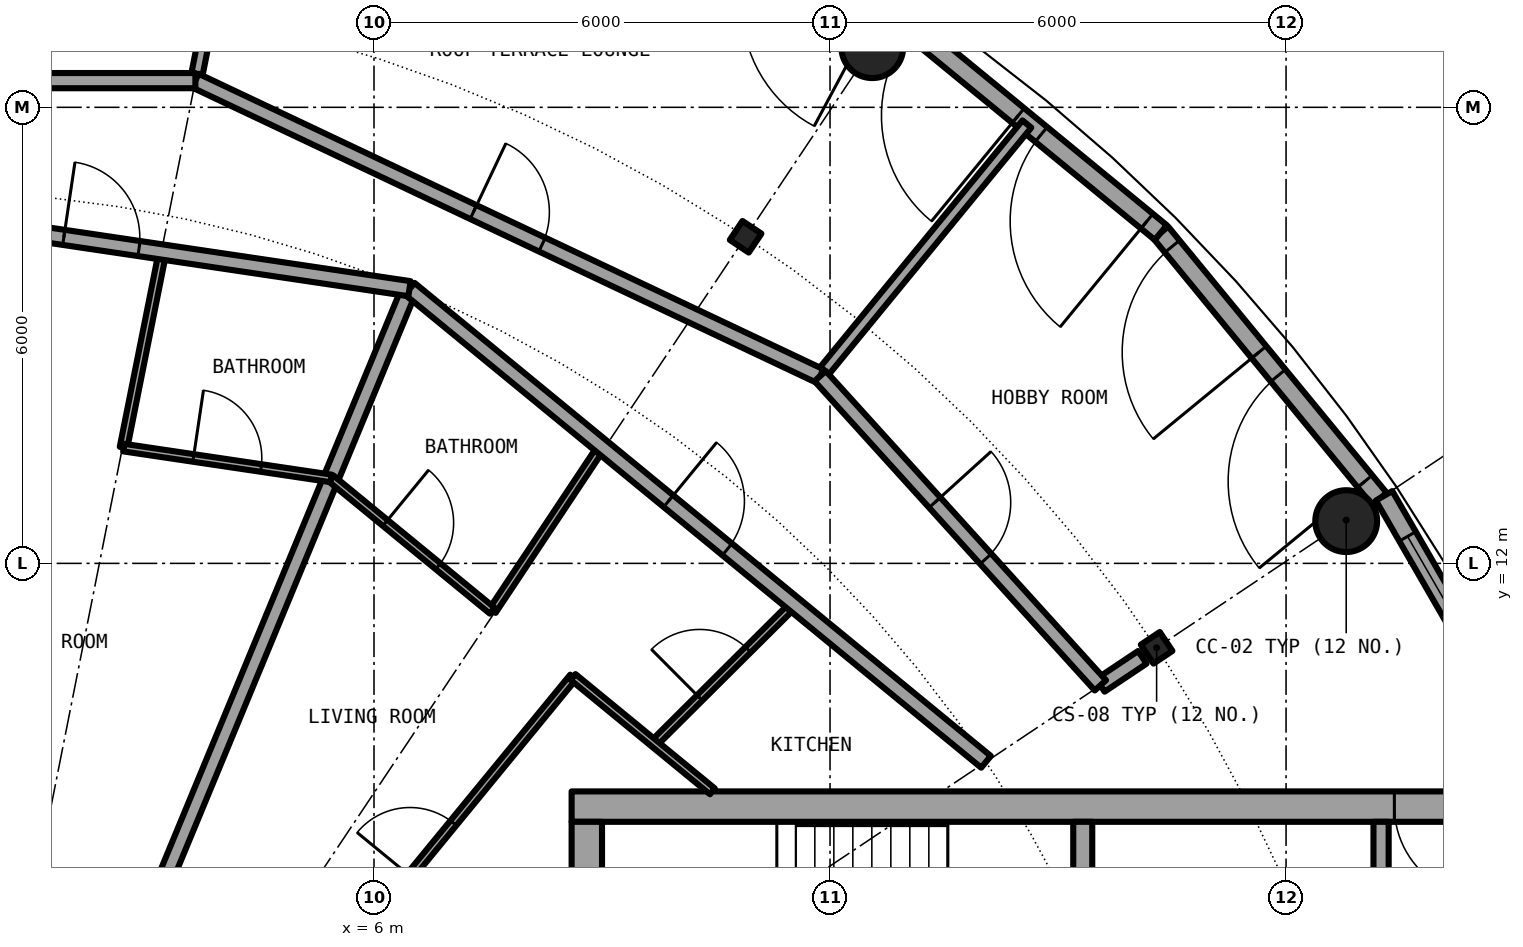
"""IFC4 building model, lengths in metres.
Left out: names, types, materials, properties, quantities, classifications, styles, units other than length and angle.
Written with IfcOpenShell. Run it as: python <this file> out.ifc"""

import sys

from ifc_helpers import new_model, si_unit, direction, frame, frame_2d, origin, origin_2d, place, context, subcontext, project, spatial, rectangle, hollow_circle, i_section, extrude, element, fill, save


model = new_model("IFC4")
c1 = context("Model", 3, precision=1e-05, world=origin(), true_north=direction((0.0, 1.0)))
c2 = subcontext(c1, "Body", "Model", "MODEL_VIEW")
j1 = project(units=[si_unit("LENGTHUNIT", "METRE"), si_unit("PLANEANGLEUNIT", "RADIAN")], contexts=[c1])
p1 = place(None, origin())
s1 = spatial("IfcSite", under=j1, at=p1, CompositionType="ELEMENT")
p2 = place(p1, origin())
s2 = spatial("IfcBuilding", under=s1, at=p2, CompositionType="ELEMENT")
p3 = place(p2, frame((0.0, 0.0, 249.3)))
s3 = spatial("IfcBuildingStorey", under=s2, at=p3, CompositionType="ELEMENT", Elevation=249.3)
for number, where, z_axis, x_axis in (
    (1, (18.791, 12.556, 0.0), (0.0, 0.0, 1.0), (1.0, 0.0, 0.0)),
    (2, (12.556, 18.791, 0.0), (0.0, 0.0, 1.0), (1.0, 0.0, 0.0)),
):
    element("IfcColumn", number, at=place(p3, frame(where, z_axis=z_axis, x_axis=x_axis)), inside=s3, PredefinedType="COLUMN", context=c2, shape_type="SweptSolid", body=[
        extrude(hollow_circle(Radius=0.406, WallThickness=0.03, at=origin_2d()), origin(), (0.0, 0.0, 1.0), 3.05),
    ])
for number, where, z_axis, x_axis in (
    (3, (16.297, 10.889, 0.0), (0.0, 0.0, 1.0), (0.831, 0.556, 0.0)),
    (4, (10.889, 16.297, 0.0), (0.0, 0.0, 1.0), (0.556, 0.831, 0.0)),
):
    element("IfcColumn", number, at=place(p3, frame(where, z_axis=z_axis, x_axis=x_axis)), inside=s3, PredefinedType="COLUMN", context=c2, shape_type="SweptSolid", body=[
        extrude(i_section(OverallWidth=0.3, OverallDepth=0.3, WebThickness=0.011, FlangeThickness=0.019, FilletRadius=0.027, at=origin_2d()), origin(), (0.0, 0.0, 1.0), 3.05),
    ])
p4 = place(p3, frame((19.228, 12.848, 0.0), z_axis=(0.0, 0.0, 1.0), x_axis=(-0.634418942337, 0.772989395532, 0.0)))
e5 = element("IfcWall", 5, at=p4, inside=s3, PredefinedType="SOLIDWALL", context=c2, shape_type="SweptSolid", body=[
    extrude(rectangle(XDim=4.533, YDim=0.25, at=frame_2d((2.267, 0.0))), origin(), (0.0, 0.0, 1.0), 2.7),
])
p5 = place(p4, frame((0.3, 0.0, 0.0)))
e6 = element("IfcOpeningElement", 6, at=p5, cuts=e5, PredefinedType="OPENING", context=c2, shape_type="SweptSolid", body=[
    extrude(rectangle(XDim=1.8, YDim=2.2, at=frame_2d((0.9, 1.1))), frame((0.0, 0.135, 0.0), z_axis=(0.0, -1.0, 0.0), x_axis=(1.0, 0.0, 0.0)), (0.0, 0.0, 1.0), 0.27),
])
p6 = place(p4, frame((2.497, 0.0, 0.0)))
e7 = element("IfcOpeningElement", 7, at=p6, cuts=e5, PredefinedType="OPENING", context=c2, shape_type="SweptSolid", body=[
    extrude(rectangle(XDim=1.8, YDim=2.2, at=frame_2d((0.9, 1.1))), frame((0.0, 0.135, 0.0), z_axis=(0.0, -1.0, 0.0), x_axis=(1.0, 0.0, 0.0)), (0.0, 0.0, 1.0), 0.27),
])
p7 = place(p3, frame((16.352, 16.352, 0.0), z_axis=(0.0, 0.0, 1.0), x_axis=(-0.772989395532, 0.634418942337, 0.0)))
e8 = element("IfcWall", 8, at=p7, inside=s3, PredefinedType="SOLIDWALL", context=c2, shape_type="SweptSolid", body=[
    extrude(rectangle(XDim=4.533, YDim=0.25, at=frame_2d((2.267, 0.0))), origin(), (0.0, 0.0, 1.0), 2.7),
])
p8 = place(p7, frame((0.236, 0.0, 0.0)))
e9 = element("IfcOpeningElement", 9, at=p8, cuts=e8, PredefinedType="OPENING", context=c2, shape_type="SweptSolid", body=[
    extrude(rectangle(XDim=1.8, YDim=2.2, at=frame_2d((0.9, 1.1))), frame((0.0, 0.135, 0.0), z_axis=(0.0, -1.0, 0.0), x_axis=(1.0, 0.0, 0.0)), (0.0, 0.0, 1.0), 0.27),
])
p9 = place(p7, frame((2.427, 0.0, 0.0)))
e10 = element("IfcOpeningElement", 10, at=p9, cuts=e8, PredefinedType="OPENING", context=c2, shape_type="SweptSolid", body=[
    extrude(rectangle(XDim=1.8, YDim=2.2, at=frame_2d((0.9, 1.1))), frame((0.0, 0.135, 0.0), z_axis=(0.0, -1.0, 0.0), x_axis=(1.0, 0.0, 0.0)), (0.0, 0.0, 1.0), 0.27),
])
p10 = place(p3, frame((20.807, 10.261, 0.0), z_axis=(0.0, 0.0, 1.0), x_axis=(-0.499903546559, 0.866081084043, 0.0)))
e11 = element("IfcWall", 11, at=p10, inside=s3, PredefinedType="SOLIDWALL", context=c2, shape_type="SweptSolid", body=[
    extrude(rectangle(XDim=3.034, YDim=0.25, at=frame_2d((1.517, 0.0))), origin(), (0.0, 0.0, 1.0), 2.7),
])
p11 = place(p10, frame((0.617, 0.0, 0.3)))
e12 = element("IfcOpeningElement", 12, at=p11, cuts=e11, PredefinedType="OPENING", context=c2, shape_type="SweptSolid", body=[
    extrude(rectangle(XDim=1.8, YDim=2.1, at=frame_2d((0.9, 1.05))), frame((0.0, 0.135, 0.0), z_axis=(0.0, -1.0, 0.0), x_axis=(1.0, 0.0, 0.0)), (0.0, 0.0, 1.0), 0.27),
])
p12 = place(p3, frame((21.1, 8.8, 0.0), z_axis=(0.0, 0.0, 1.0), x_axis=(-1.0, 0.0, 0.0)))
e13 = element("IfcWall", 13, at=p12, inside=s3, PredefinedType="SHEAR", context=c2, shape_type="SweptSolid", body=[
    extrude(rectangle(XDim=12.5, YDim=0.4, at=frame_2d((6.25, 0.0))), origin(), (0.0, 0.0, 1.0), 3.05),
])
p13 = place(p12, frame((0.475, 0.0, 0.0)))
e14 = element("IfcOpeningElement", 14, at=p13, cuts=e13, PredefinedType="OPENING", context=c2, shape_type="SweptSolid", body=[
    extrude(rectangle(XDim=1.2, YDim=2.3, at=frame_2d((0.6, 1.15))), frame((0.0, 0.21, 0.0), z_axis=(0.0, -1.0, 0.0), x_axis=(1.0, 0.0, 0.0)), (0.0, 0.0, 1.0), 0.42),
])
p14 = place(p3, frame((8.8, -8.6, 0.0), z_axis=(0.0, 0.0, 1.0), x_axis=(0.0, 1.0, 0.0)))
e15 = element("IfcWall", 15, at=p14, inside=s3, PredefinedType="SHEAR", context=c2, shape_type="SweptSolid", body=[
    extrude(rectangle(XDim=17.2, YDim=0.4, at=frame_2d((8.6, 0.0))), origin(), (0.0, 0.0, 1.0), 3.05),
])
p15 = place(p14, frame((7.4, 0.0, 0.1)))
e16 = element("IfcOpeningElement", 16, at=p15, cuts=e15, PredefinedType="OPENING", context=c2, shape_type="SweptSolid", body=[
    extrude(rectangle(XDim=2.4, YDim=2.2, at=frame_2d((1.2, 1.1))), frame((0.0, 0.21, 0.0), z_axis=(0.0, -1.0, 0.0), x_axis=(1.0, 0.0, 0.0)), (0.0, 0.0, 1.0), 0.42),
])
p16 = place(p3, frame((15.325, 4.65, 0.0), z_axis=(0.0, 0.0, 1.0), x_axis=(0.0, 1.0, 0.0)))
e17 = element("IfcWall", 17, at=p16, inside=s3, PredefinedType="SHEAR", context=c2, shape_type="SweptSolid", body=[
    extrude(rectangle(XDim=3.95, YDim=0.25, at=frame_2d((1.975, 0.0))), origin(), (0.0, 0.0, 1.0), 3.05),
])
p17 = place(p16, frame((1.375, 0.0, 0.0)))
e18 = element("IfcOpeningElement", 18, at=p17, cuts=e17, PredefinedType="OPENING", context=c2, shape_type="SweptSolid", body=[
    extrude(rectangle(XDim=1.2, YDim=2.3, at=frame_2d((0.6, 1.15))), frame((0.0, 0.135, 0.0), z_axis=(0.0, -1.0, 0.0), x_axis=(1.0, 0.0, 0.0)), (0.0, 0.0, 1.0), 0.27),
])
p18 = place(p3, frame((19.25, 1.575, 0.0), z_axis=(0.0, 0.0, 1.0), x_axis=(0.0, 1.0, 0.0)))
e19 = element("IfcWall", 19, at=p18, inside=s3, PredefinedType="SOLIDWALL", context=c2, shape_type="SweptSolid", body=[
    extrude(rectangle(XDim=7.025, YDim=0.2, at=frame_2d((3.513, 0.0))), origin(), (0.0, 0.0, 1.0), 2.7),
])
p19 = place(p18, frame((4.475, 0.0, 0.0)))
e20 = element("IfcOpeningElement", 20, at=p19, cuts=e19, PredefinedType="OPENING", context=c2, shape_type="SweptSolid", body=[
    extrude(rectangle(XDim=1.1, YDim=2.3, at=frame_2d((0.55, 1.15))), frame((0.0, 0.11, 0.0), z_axis=(0.0, -1.0, 0.0), x_axis=(1.0, 0.0, 0.0)), (0.0, 0.0, 1.0), 0.22),
])
p20 = place(p3, frame((2.704, 13.524, 0.0), z_axis=(0.0, 0.0, 1.0), x_axis=(0.195937128464, 0.980616460034, 0.0)))
e21 = element("IfcWall", 21, at=p20, inside=s3, PredefinedType="PARTITIONING", context=c2, shape_type="SweptSolid", body=[
    extrude(rectangle(XDim=2.623, YDim=0.1, at=frame_2d((1.312, 0.0))), origin(), (0.0, 0.0, 1.0), 2.7),
])
p21 = place(p3, frame((2.955, 7.132, 0.0), z_axis=(0.0, 0.0, 1.0), x_axis=(0.382556139466, 0.923932248683, 0.0)))
e22 = element("IfcWall", 22, at=p21, inside=s3, PredefinedType="PARTITIONING", context=c2, shape_type="SweptSolid", body=[
    extrude(rectangle(XDim=9.18, YDim=0.2, at=frame_2d((4.59, 0.0))), origin(), (0.0, 0.0, 1.0), 2.7),
])
p22 = place(p3, frame((3.654, 18.35, 0.0), z_axis=(0.0, 0.0, 1.0), x_axis=(0.194656627734, 0.980871447887, 0.0)))
e23 = element("IfcWall", 23, at=p22, inside=s3, PredefinedType="PARTITIONING", context=c2, shape_type="SweptSolid", body=[
    extrude(rectangle(XDim=0.74, YDim=0.15, at=frame_2d((0.37, 0.0))), origin(), (0.0, 0.0, 1.0), 2.7),
])
p23 = place(p3, frame((4.898, 5.968, 0.0), z_axis=(0.0, 0.0, 1.0), x_axis=(0.634358693064, 0.773038840249, 0.0)))
e24 = element("IfcWall", 24, at=p23, inside=s3, PredefinedType="PARTITIONING", context=c2, shape_type="SweptSolid", body=[
    extrude(rectangle(XDim=5.868, YDim=0.1, at=frame_2d((2.934, 0.0))), origin(), (0.0, 0.0, 1.0), 2.7),
])
p24 = place(p23, frame((2.484, 0.0, 0.0)))
e25 = element("IfcOpeningElement", 25, at=p24, cuts=e24, PredefinedType="OPENING", context=c2, shape_type="SweptSolid", body=[
    extrude(rectangle(XDim=0.9, YDim=2.3, at=frame_2d((0.45, 1.15))), frame((0.0, 0.06, 0.0), z_axis=(0.0, -1.0, 0.0), x_axis=(1.0, 0.0, 0.0)), (0.0, 0.0, 1.0), 0.12),
])
p25 = place(p3, frame((7.558, 11.376, 0.0), z_axis=(0.0, 0.0, 1.0), x_axis=(0.553615197403, 0.83277260594, 0.0)))
e26 = element("IfcWall", 26, at=p25, inside=s3, PredefinedType="PARTITIONING", context=c2, shape_type="SweptSolid", body=[
    extrude(rectangle(XDim=2.597, YDim=0.1, at=frame_2d((1.299, 0.0))), origin(), (0.0, 0.0, 1.0), 2.7),
])
p26 = place(p3, frame((9.683, 9.632, 0.0), z_axis=(0.0, 0.0, 1.0), x_axis=(0.708796844581, 0.705412668665, 0.0)))
e27 = element("IfcWall", 27, at=p26, inside=s3, PredefinedType="PARTITIONING", context=c2, shape_type="SweptSolid", body=[
    extrude(rectangle(XDim=2.597, YDim=0.1, at=frame_2d((1.299, 0.0))), origin(), (0.0, 0.0, 1.0), 2.7),
])
p27 = place(p26, frame((0.849, 0.0, 0.0)))
e28 = element("IfcOpeningElement", 28, at=p27, cuts=e27, PredefinedType="OPENING", context=c2, shape_type="SweptSolid", body=[
    extrude(rectangle(XDim=0.9, YDim=2.3, at=frame_2d((0.45, 1.15))), frame((0.0, 0.06, 0.0), z_axis=(0.0, -1.0, 0.0), x_axis=(1.0, 0.0, 0.0)), (0.0, 0.0, 1.0), 0.12),
])
p28 = place(p3, frame((11.87, 14.464, 0.0), z_axis=(0.0, 0.0, 1.0), x_axis=(0.634207563301, 0.773162833206, 0.0)))
e29 = element("IfcWall", 29, at=p28, inside=s3, PredefinedType="PARTITIONING", context=c2, shape_type="SweptSolid", body=[
    extrude(rectangle(XDim=4.289, YDim=0.15, at=frame_2d((2.145, 0.0))), origin(), (0.0, 0.0, 1.0), 2.7),
])
p29 = place(p3, frame((15.557, 10.395, 0.0), z_axis=(0.0, 0.0, 1.0), x_axis=(0.831427465951, 0.555633304313, 0.0)))
e30 = element("IfcWall", 30, at=p29, inside=s3, PredefinedType="PARTITIONING", context=c2, shape_type="SweptSolid", body=[
    extrude(rectangle(XDim=0.664, YDim=0.2, at=frame_2d((0.332, 0.0))), origin(), (0.0, 0.0, 1.0), 2.7),
])
p30 = place(p3, frame((5.431, 13.12, 0.0), z_axis=(0.0, 0.0, 1.0), x_axis=(0.773149312811, -0.634224045665, 0.0)))
e31 = element("IfcWall", 31, at=p30, inside=s3, PredefinedType="PARTITIONING", context=c2, shape_type="SweptSolid", body=[
    extrude(rectangle(XDim=2.749, YDim=0.1, at=frame_2d((1.374, 0.0))), origin(), (0.0, 0.0, 1.0), 2.7),
])
p31 = place(p30, frame((0.927, 0.0, 0.0)))
e32 = element("IfcOpeningElement", 32, at=p31, cuts=e31, PredefinedType="OPENING", context=c2, shape_type="SweptSolid", body=[
    extrude(rectangle(XDim=0.9, YDim=2.3, at=frame_2d((0.45, 1.15))), frame((0.0, 0.06, 0.0), z_axis=(0.0, -1.0, 0.0), x_axis=(1.0, 0.0, 0.0)), (0.0, 0.0, 1.0), 0.12),
])
p32 = place(p3, frame((8.619, 10.505, 0.0), z_axis=(0.0, 0.0, 1.0), x_axis=(0.773094085324, -0.634291364624, 0.0)))
e33 = element("IfcWall", 33, at=p32, inside=s3, PredefinedType="PARTITIONING", context=c2, shape_type="SweptSolid", body=[
    extrude(rectangle(XDim=2.371, YDim=0.1, at=frame_2d((1.186, 0.0))), origin(), (0.0, 0.0, 1.0), 2.7),
])
p33 = place(p3, frame((2.707, 13.523, 0.0), z_axis=(0.0, 0.0, 1.0), x_axis=(0.98916494308, -0.146808430897, 0.0)))
e34 = element("IfcWall", 34, at=p33, inside=s3, PredefinedType="PARTITIONING", context=c2, shape_type="SweptSolid", body=[
    extrude(rectangle(XDim=2.759, YDim=0.1, at=frame_2d((1.379, 0.0))), origin(), (0.0, 0.0, 1.0), 2.7),
])
p34 = place(p33, frame((0.927, 0.0, 0.0)))
e35 = element("IfcOpeningElement", 35, at=p34, cuts=e34, PredefinedType="OPENING", context=c2, shape_type="SweptSolid", body=[
    extrude(rectangle(XDim=0.9, YDim=2.3, at=frame_2d((0.45, 1.15))), frame((0.0, 0.06, 0.0), z_axis=(0.0, -1.0, 0.0), x_axis=(1.0, 0.0, 0.0)), (0.0, 0.0, 1.0), 0.12),
])
p35 = place(p3, frame((6.47, 15.613, 0.0), z_axis=(0.0, 0.0, 1.0), x_axis=(0.77292501819, -0.634497372931, 0.0)))
e36 = element("IfcWall", 36, at=p35, inside=s3, PredefinedType="PARTITIONING", context=c2, shape_type="SweptSolid", body=[
    extrude(rectangle(XDim=9.81, YDim=0.2, at=frame_2d((4.905, 0.0))), origin(), (0.0, 0.0, 1.0), 2.7),
])
p36 = place(p35, frame((4.404, 0.0, 0.0)))
e37 = element("IfcOpeningElement", 37, at=p36, cuts=e36, PredefinedType="OPENING", context=c2, shape_type="SweptSolid", body=[
    extrude(rectangle(XDim=1.0, YDim=2.3, at=frame_2d((0.5, 1.15))), frame((0.0, 0.11, 0.0), z_axis=(0.0, -1.0, 0.0), x_axis=(1.0, 0.0, 0.0)), (0.0, 0.0, 1.0), 0.22),
])
p37 = place(p3, frame((-1.656, 16.819, 0.0), z_axis=(0.0, 0.0, 1.0), x_axis=(0.989174071716, -0.146746910856, 0.0)))
e38 = element("IfcWall", 38, at=p37, inside=s3, PredefinedType="PARTITIONING", context=c2, shape_type="SweptSolid", body=[
    extrude(rectangle(XDim=8.212, YDim=0.2, at=frame_2d((4.106, 0.0))), origin(), (0.0, 0.0, 1.0), 2.7),
])
p38 = place(p37, frame((3.614, 0.0, 0.0)))
e39 = element("IfcOpeningElement", 39, at=p38, cuts=e38, PredefinedType="OPENING", context=c2, shape_type="SweptSolid", body=[
    extrude(rectangle(XDim=1.0, YDim=2.3, at=frame_2d((0.5, 1.15))), frame((0.0, 0.11, 0.0), z_axis=(0.0, -1.0, 0.0), x_axis=(1.0, 0.0, 0.0)), (0.0, 0.0, 1.0), 0.22),
])
p39 = place(p3, frame((3.65, 18.351, 0.0), z_axis=(0.0, 0.0, 1.0), x_axis=(0.904027935406, -0.427473381634, 0.0)))
e40 = element("IfcWall", 40, at=p39, inside=s3, PredefinedType="PARTITIONING", context=c2, shape_type="SweptSolid", body=[
    extrude(rectangle(XDim=9.093, YDim=0.2, at=frame_2d((4.546, 0.0))), origin(), (0.0, 0.0, 1.0), 2.7),
])
p40 = place(p39, frame((4.046, 0.0, 0.0)))
e41 = element("IfcOpeningElement", 41, at=p40, cuts=e40, PredefinedType="OPENING", context=c2, shape_type="SweptSolid", body=[
    extrude(rectangle(XDim=1.0, YDim=2.3, at=frame_2d((0.5, 1.15))), frame((0.0, 0.11, 0.0), z_axis=(0.0, -1.0, 0.0), x_axis=(1.0, 0.0, 0.0)), (0.0, 0.0, 1.0), 0.22),
])
p41 = place(p3, frame((-3.65, 18.351, 0.0), z_axis=(0.0, 0.0, 1.0), x_axis=(1.0, 0.0, 0.0)))
e42 = element("IfcWall", 42, at=p41, inside=s3, PredefinedType="PARTITIONING", context=c2, shape_type="SweptSolid", body=[
    extrude(rectangle(XDim=7.3, YDim=0.2, at=frame_2d((3.65, 0.0))), origin(), (0.0, 0.0, 1.0), 2.7),
])
p42 = place(p41, frame((3.15, 0.0, 0.0)))
e43 = element("IfcOpeningElement", 43, at=p42, cuts=e42, PredefinedType="OPENING", context=c2, shape_type="SweptSolid", body=[
    extrude(rectangle(XDim=1.0, YDim=2.3, at=frame_2d((0.5, 1.15))), frame((0.0, 0.11, 0.0), z_axis=(0.0, -1.0, 0.0), x_axis=(1.0, 0.0, 0.0)), (0.0, 0.0, 1.0), 0.22),
])
p43 = place(p3, frame((11.87, 14.464, 0.0), z_axis=(0.0, 0.0, 1.0), x_axis=(0.671434738137, -0.741063689856, 0.0)))
e44 = element("IfcWall", 44, at=p43, inside=s3, PredefinedType="PARTITIONING", context=c2, shape_type="SweptSolid", body=[
    extrude(rectangle(XDim=5.491, YDim=0.2, at=frame_2d((2.746, 0.0))), origin(), (0.0, 0.0, 1.0), 2.7),
])
p44 = place(p43, frame((2.245, 0.0, 0.0)))
e45 = element("IfcOpeningElement", 45, at=p44, cuts=e44, PredefinedType="OPENING", context=c2, shape_type="SweptSolid", body=[
    extrude(rectangle(XDim=1.0, YDim=2.3, at=frame_2d((0.5, 1.15))), frame((0.0, 0.11, 0.0), z_axis=(0.0, -1.0, 0.0), x_axis=(1.0, 0.0, 0.0)), (0.0, 0.0, 1.0), 0.22),
])
p45 = place(p5, origin())
e46 = element("IfcDoor", 46, at=p45, inside=s3, OperationType="SINGLE_SWING_LEFT", PredefinedType="DOOR", context=c2, shape_type="SweptSolid", body=[
    extrude(rectangle(XDim=1.8, YDim=2.2, at=frame_2d((0.9, 1.1))), frame((0.0, 0.025, 0.0), z_axis=(0.0, -1.0, 0.0), x_axis=(1.0, 0.0, 0.0)), (0.0, 0.0, 1.0), 0.05),
])
fill(e6, e46)
p46 = place(p6, origin())
e47 = element("IfcDoor", 47, at=p46, inside=s3, OperationType="SINGLE_SWING_LEFT", PredefinedType="DOOR", context=c2, shape_type="SweptSolid", body=[
    extrude(rectangle(XDim=1.8, YDim=2.2, at=frame_2d((0.9, 1.1))), frame((0.0, 0.025, 0.0), z_axis=(0.0, -1.0, 0.0), x_axis=(1.0, 0.0, 0.0)), (0.0, 0.0, 1.0), 0.05),
])
fill(e7, e47)
p47 = place(p8, origin())
e48 = element("IfcDoor", 48, at=p47, inside=s3, OperationType="SINGLE_SWING_LEFT", PredefinedType="DOOR", context=c2, shape_type="SweptSolid", body=[
    extrude(rectangle(XDim=1.8, YDim=2.2, at=frame_2d((0.9, 1.1))), frame((0.0, 0.025, 0.0), z_axis=(0.0, -1.0, 0.0), x_axis=(1.0, 0.0, 0.0)), (0.0, 0.0, 1.0), 0.05),
])
fill(e9, e48)
p48 = place(p9, origin())
e49 = element("IfcDoor", 49, at=p48, inside=s3, OperationType="SINGLE_SWING_LEFT", PredefinedType="DOOR", context=c2, shape_type="SweptSolid", body=[
    extrude(rectangle(XDim=1.8, YDim=2.2, at=frame_2d((0.9, 1.1))), frame((0.0, 0.025, 0.0), z_axis=(0.0, -1.0, 0.0), x_axis=(1.0, 0.0, 0.0)), (0.0, 0.0, 1.0), 0.05),
])
fill(e10, e49)
p49 = place(p11, origin())
e50 = element("IfcWindow", 50, at=p49, inside=s3, PartitioningType="SINGLE_PANEL", PredefinedType="WINDOW", context=c2, shape_type="SweptSolid", body=[
    extrude(rectangle(XDim=1.8, YDim=2.1, at=frame_2d((0.9, 1.05))), frame((0.0, 0.03, 0.0), z_axis=(0.0, -1.0, 0.0), x_axis=(1.0, 0.0, 0.0)), (0.0, 0.0, 1.0), 0.06),
])
fill(e12, e50)
p50 = place(p13, origin())
e51 = element("IfcDoor", 51, at=p50, inside=s3, OperationType="SINGLE_SWING_RIGHT", PredefinedType="DOOR", context=c2, shape_type="SweptSolid", body=[
    extrude(rectangle(XDim=1.2, YDim=2.3, at=frame_2d((0.6, 1.15))), frame((0.0, 0.025, 0.0), z_axis=(0.0, -1.0, 0.0), x_axis=(1.0, 0.0, 0.0)), (0.0, 0.0, 1.0), 0.05),
])
fill(e14, e51)
p51 = place(p44, origin())
e52 = element("IfcDoor", 52, at=p51, inside=s3, OperationType="SINGLE_SWING_LEFT", PredefinedType="DOOR", context=c2, shape_type="SweptSolid", body=[
    extrude(rectangle(XDim=1.0, YDim=2.3, at=frame_2d((0.5, 1.15))), frame((0.0, 0.025, 0.0), z_axis=(0.0, -1.0, 0.0), x_axis=(1.0, 0.0, 0.0)), (0.0, 0.0, 1.0), 0.05),
])
fill(e45, e52)
p52 = place(p40, origin())
e53 = element("IfcDoor", 53, at=p52, inside=s3, OperationType="SINGLE_SWING_RIGHT", PredefinedType="DOOR", context=c2, shape_type="SweptSolid", body=[
    extrude(rectangle(XDim=1.0, YDim=2.3, at=frame_2d((0.5, 1.15))), frame((0.0, 0.025, 0.0), z_axis=(0.0, -1.0, 0.0), x_axis=(1.0, 0.0, 0.0)), (0.0, 0.0, 1.0), 0.05),
])
fill(e41, e53)
p53 = place(p36, origin())
e54 = element("IfcDoor", 54, at=p53, inside=s3, OperationType="SINGLE_SWING_LEFT", PredefinedType="DOOR", context=c2, shape_type="SweptSolid", body=[
    extrude(rectangle(XDim=1.0, YDim=2.3, at=frame_2d((0.5, 1.15))), frame((0.0, 0.025, 0.0), z_axis=(0.0, -1.0, 0.0), x_axis=(1.0, 0.0, 0.0)), (0.0, 0.0, 1.0), 0.05),
])
fill(e37, e54)
p54 = place(p31, origin())
e55 = element("IfcDoor", 55, at=p54, inside=s3, OperationType="SINGLE_SWING_RIGHT", PredefinedType="DOOR", context=c2, shape_type="SweptSolid", body=[
    extrude(rectangle(XDim=0.9, YDim=2.3, at=frame_2d((0.45, 1.15))), frame((0.0, 0.025, 0.0), z_axis=(0.0, -1.0, 0.0), x_axis=(1.0, 0.0, 0.0)), (0.0, 0.0, 1.0), 0.05),
])
fill(e32, e55)
p55 = place(p27, origin())
e56 = element("IfcDoor", 56, at=p55, inside=s3, OperationType="SINGLE_SWING_LEFT", PredefinedType="DOOR", context=c2, shape_type="SweptSolid", body=[
    extrude(rectangle(XDim=0.9, YDim=2.3, at=frame_2d((0.45, 1.15))), frame((0.0, 0.025, 0.0), z_axis=(0.0, -1.0, 0.0), x_axis=(1.0, 0.0, 0.0)), (0.0, 0.0, 1.0), 0.05),
])
fill(e28, e56)
p56 = place(p24, origin())
e57 = element("IfcDoor", 57, at=p56, inside=s3, OperationType="SINGLE_SWING_RIGHT", PredefinedType="DOOR", context=c2, shape_type="SweptSolid", body=[
    extrude(rectangle(XDim=0.9, YDim=2.3, at=frame_2d((0.45, 1.15))), frame((0.0, 0.025, 0.0), z_axis=(0.0, -1.0, 0.0), x_axis=(1.0, 0.0, 0.0)), (0.0, 0.0, 1.0), 0.05),
])
fill(e25, e57)
p57 = place(p38, origin())
e58 = element("IfcDoor", 58, at=p57, inside=s3, OperationType="SINGLE_SWING_RIGHT", PredefinedType="DOOR", context=c2, shape_type="SweptSolid", body=[
    extrude(rectangle(XDim=1.0, YDim=2.3, at=frame_2d((0.5, 1.15))), frame((0.0, 0.025, 0.0), z_axis=(0.0, -1.0, 0.0), x_axis=(1.0, 0.0, 0.0)), (0.0, 0.0, 1.0), 0.05),
])
fill(e39, e58)
p58 = place(p34, origin())
e59 = element("IfcDoor", 59, at=p58, inside=s3, OperationType="SINGLE_SWING_LEFT", PredefinedType="DOOR", context=c2, shape_type="SweptSolid", body=[
    extrude(rectangle(XDim=0.9, YDim=2.3, at=frame_2d((0.45, 1.15))), frame((0.0, 0.025, 0.0), z_axis=(0.0, -1.0, 0.0), x_axis=(1.0, 0.0, 0.0)), (0.0, 0.0, 1.0), 0.05),
])
fill(e35, e59)
save(model, sys.argv[1])
